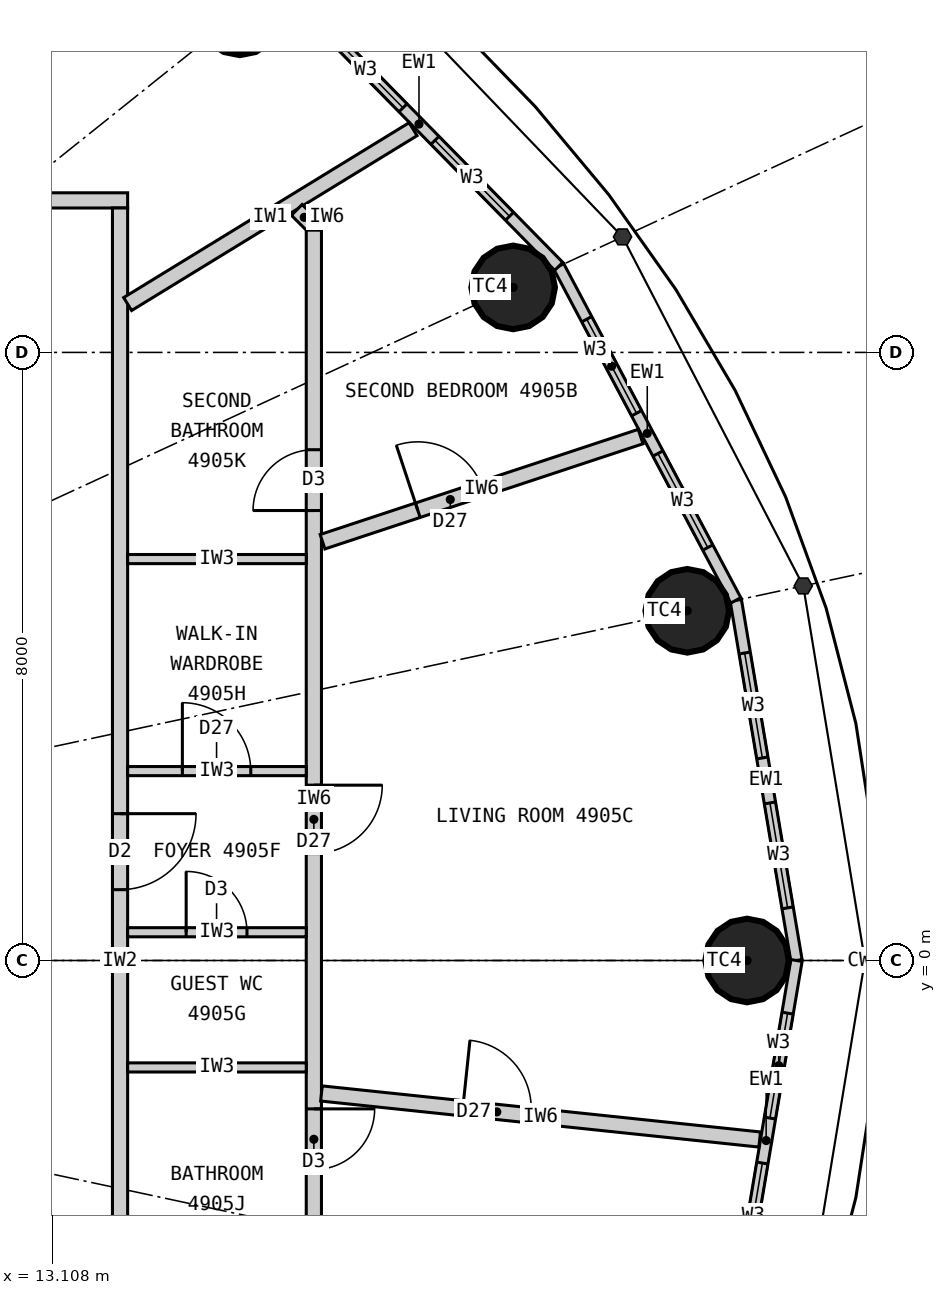
"""IFC4 building model, lengths in metres.
Left out: names, types, materials, properties, quantities, classifications, styles, units other than length and angle.
Written with IfcOpenShell. Run it as: python <this file> out.ifc"""

import sys

from ifc_helpers import new_model, si_unit, direction, frame, frame_2d, origin, origin_2d, place, context, subcontext, project, spatial, rectangle, circle, extrude, clip, halfspace, element, fill, save


model = new_model("IFC4")
c1 = context("Model", 3, precision=1e-05, world=origin(), true_north=direction((0.0, 1.0)))
c2 = subcontext(c1, "Body", "Model", "MODEL_VIEW")
j1 = project(units=[si_unit("LENGTHUNIT", "METRE"), si_unit("PLANEANGLEUNIT", "RADIAN")], contexts=[c1])
p1 = place(None, origin())
s1 = spatial("IfcSite", under=j1, at=p1, CompositionType="ELEMENT")
p2 = place(p1, origin())
s2 = spatial("IfcBuilding", under=s1, at=p2, CompositionType="ELEMENT")
p3 = place(p2, frame((0.0, 0.0, 183.0)))
s3 = spatial("IfcBuildingStorey", under=s2, at=p3, CompositionType="ELEMENT", Elevation=183.0)
for number, where, z_axis, x_axis in (
    (1, (22.25, 0.0, 0.0), (0.0, 0.0, 1.0), (1.0, 0.0, 0.0)),
    (2, (21.463, 4.601, 0.0), (0.0, 0.0, 1.0), (1.0, 0.0, 0.0)),
    (3, (19.172, 8.855, 0.0), (0.0, 0.0, 1.0), (1.0, 0.0, 0.0)),
    (4, (15.576, 12.461, 0.0), (0.0, 0.0, 1.0), (1.0, 0.0, 0.0)),
):
    element("IfcColumn", number, at=place(p3, frame(where, z_axis=z_axis, x_axis=x_axis)), inside=s3, PredefinedType="COLUMN", context=c2, shape_type="Clipping", body=[
        clip(extrude(circle(Radius=0.55, at=origin_2d()), origin(), (0.0, 0.0, 1.0), 3.3), halfspace(frame((0.0, 0.0, 2.25), z_axis=(0.0, 0.0, 1.0), x_axis=(1.0, 0.0, 0.0)), False)),
    ])
p4 = place(p3, frame((22.9, 0.0, 0.0), z_axis=(0.0, 0.0, 1.0), x_axis=(-0.166162111254, 0.986098449843, 0.0)))
e5 = element("IfcWall", 5, at=p4, inside=s3, PredefinedType="ELEMENTEDWALL", context=c2, shape_type="SweptSolid", body=[
    extrude(rectangle(XDim=4.805, YDim=0.15, at=frame_2d((2.402, 0.0))), origin(), (0.0, 0.0, 1.0), 3.05),
])
p5 = place(p4, frame((0.702, 0.0, 0.9)))
e6 = element("IfcOpeningElement", 6, at=p5, cuts=e5, PredefinedType="OPENING", context=c2, shape_type="SweptSolid", body=[
    extrude(rectangle(XDim=1.4, YDim=1.9, at=frame_2d((0.7, 0.95))), frame((0.0, 0.085, 0.0), z_axis=(0.0, -1.0, 0.0), x_axis=(1.0, 0.0, 0.0)), (0.0, 0.0, 1.0), 0.17),
])
p6 = place(p4, frame((2.702, 0.0, 0.9)))
e7 = element("IfcOpeningElement", 7, at=p6, cuts=e5, PredefinedType="OPENING", context=c2, shape_type="SweptSolid", body=[
    extrude(rectangle(XDim=1.4, YDim=1.9, at=frame_2d((0.7, 0.95))), frame((0.0, 0.085, 0.0), z_axis=(0.0, -1.0, 0.0), x_axis=(1.0, 0.0, 0.0)), (0.0, 0.0, 1.0), 0.17),
])
p7 = place(p3, frame((22.102, 4.738, 0.0), z_axis=(0.0, 0.0, 1.0), x_axis=(-0.468428906714, 0.883501193748, 0.0)))
e8 = element("IfcWall", 8, at=p7, inside=s3, PredefinedType="ELEMENTEDWALL", context=c2, shape_type="SweptSolid", body=[
    extrude(rectangle(XDim=4.974, YDim=0.15, at=frame_2d((2.487, 0.0))), origin(), (0.0, 0.0, 1.0), 3.05),
])
p8 = place(p7, frame((0.787, 0.0, 0.9)))
e9 = element("IfcOpeningElement", 9, at=p8, cuts=e8, PredefinedType="OPENING", context=c2, shape_type="SweptSolid", body=[
    extrude(rectangle(XDim=1.4, YDim=1.9, at=frame_2d((0.7, 0.95))), frame((0.0, 0.085, 0.0), z_axis=(0.0, -1.0, 0.0), x_axis=(1.0, 0.0, 0.0)), (0.0, 0.0, 1.0), 0.17),
])
p9 = place(p7, frame((2.787, 0.0, 0.9)))
e10 = element("IfcOpeningElement", 10, at=p9, cuts=e8, PredefinedType="OPENING", context=c2, shape_type="SweptSolid", body=[
    extrude(rectangle(XDim=1.4, YDim=1.9, at=frame_2d((0.7, 0.95))), frame((0.0, 0.085, 0.0), z_axis=(0.0, -1.0, 0.0), x_axis=(1.0, 0.0, 0.0)), (0.0, 0.0, 1.0), 0.17),
])
p10 = place(p3, frame((19.772, 9.132, 0.0), z_axis=(0.0, 0.0, 1.0), x_axis=(-0.700727467776, 0.71342905457, 0.0)))
e11 = element("IfcWall", 11, at=p10, inside=s3, PredefinedType="ELEMENTEDWALL", context=c2, shape_type="SweptSolid", body=[
    extrude(rectangle(XDim=5.247, YDim=0.15, at=frame_2d((2.624, 0.0))), origin(), (0.0, 0.0, 1.0), 3.05),
])
p11 = place(p10, frame((0.924, 0.0, 0.9)))
e12 = element("IfcOpeningElement", 12, at=p11, cuts=e11, PredefinedType="OPENING", context=c2, shape_type="SweptSolid", body=[
    extrude(rectangle(XDim=1.4, YDim=1.9, at=frame_2d((0.7, 0.95))), frame((0.0, 0.085, 0.0), z_axis=(0.0, -1.0, 0.0), x_axis=(1.0, 0.0, 0.0)), (0.0, 0.0, 1.0), 0.17),
])
p12 = place(p10, frame((2.924, 0.0, 0.9)))
e13 = element("IfcOpeningElement", 13, at=p12, cuts=e11, PredefinedType="OPENING", context=c2, shape_type="SweptSolid", body=[
    extrude(rectangle(XDim=1.4, YDim=1.9, at=frame_2d((0.7, 0.95))), frame((0.0, 0.085, 0.0), z_axis=(0.0, -1.0, 0.0), x_axis=(1.0, 0.0, 0.0)), (0.0, 0.0, 1.0), 0.17),
])
p13 = place(p3, frame((22.102, -4.738, 0.0), z_axis=(0.0, 0.0, 1.0), x_axis=(0.166162111254, 0.986098449843, 0.0)))
e14 = element("IfcWall", 14, at=p13, inside=s3, PredefinedType="ELEMENTEDWALL", context=c2, shape_type="SweptSolid", body=[
    extrude(rectangle(XDim=4.805, YDim=0.15, at=frame_2d((2.402, 0.0))), origin(), (0.0, 0.0, 1.0), 3.05),
])
p14 = place(p13, frame((0.702, 0.0, 0.9)))
e15 = element("IfcOpeningElement", 15, at=p14, cuts=e14, PredefinedType="OPENING", context=c2, shape_type="SweptSolid", body=[
    extrude(rectangle(XDim=1.4, YDim=1.9, at=frame_2d((0.7, 0.95))), frame((0.0, 0.085, 0.0), z_axis=(0.0, -1.0, 0.0), x_axis=(1.0, 0.0, 0.0)), (0.0, 0.0, 1.0), 0.17),
])
p15 = place(p13, frame((2.702, 0.0, 0.9)))
e16 = element("IfcOpeningElement", 16, at=p15, cuts=e14, PredefinedType="OPENING", context=c2, shape_type="SweptSolid", body=[
    extrude(rectangle(XDim=1.4, YDim=1.9, at=frame_2d((0.7, 0.95))), frame((0.0, 0.085, 0.0), z_axis=(0.0, -1.0, 0.0), x_axis=(1.0, 0.0, 0.0)), (0.0, 0.0, 1.0), 0.17),
])
p16 = place(p3, frame((-14.1, 10.0, 0.0), z_axis=(0.0, 0.0, 1.0), x_axis=(1.0, 0.0, 0.0)))
e17 = element("IfcWall", 17, at=p16, inside=s3, PredefinedType="PARTITIONING", context=c2, shape_type="SweptSolid", body=[
    extrude(rectangle(XDim=28.2, YDim=0.2, at=frame_2d((14.1, 0.0))), origin(), (0.0, 0.0, 1.0), 3.05),
])
p17 = place(p16, frame((24.549, 0.0, 0.0)))
e18 = element("IfcOpeningElement", 18, at=p17, cuts=e17, PredefinedType="OPENING", context=c2, shape_type="SweptSolid", body=[
    extrude(rectangle(XDim=1.0, YDim=2.2, at=frame_2d((0.5, 1.1))), frame((0.0, 0.11, 0.0), z_axis=(0.0, -1.0, 0.0), x_axis=(1.0, 0.0, 0.0)), (0.0, 0.0, 1.0), 0.22),
])
p18 = place(p16, frame((18.829, 0.0, 0.0)))
e19 = element("IfcOpeningElement", 19, at=p18, cuts=e17, PredefinedType="OPENING", context=c2, shape_type="SweptSolid", body=[
    extrude(rectangle(XDim=1.0, YDim=2.2, at=frame_2d((0.5, 1.1))), frame((0.0, 0.11, 0.0), z_axis=(0.0, -1.0, 0.0), x_axis=(1.0, 0.0, 0.0)), (0.0, 0.0, 1.0), 0.22),
])
p19 = place(p16, frame((12.8, 0.0, 0.0)))
e20 = element("IfcOpeningElement", 20, at=p19, cuts=e17, PredefinedType="OPENING", context=c2, shape_type="SweptSolid", body=[
    extrude(rectangle(XDim=1.0, YDim=2.2, at=frame_2d((0.5, 1.1))), frame((0.0, 0.11, 0.0), z_axis=(0.0, -1.0, 0.0), x_axis=(1.0, 0.0, 0.0)), (0.0, 0.0, 1.0), 0.22),
])
p20 = place(p16, frame((5.25, 0.0, 0.0)))
e21 = element("IfcOpeningElement", 21, at=p20, cuts=e17, PredefinedType="OPENING", context=c2, shape_type="SweptSolid", body=[
    extrude(rectangle(XDim=1.0, YDim=2.2, at=frame_2d((0.5, 1.1))), frame((0.0, 0.11, 0.0), z_axis=(0.0, -1.0, 0.0), x_axis=(1.0, 0.0, 0.0)), (0.0, 0.0, 1.0), 0.22),
])
p21 = place(p3, frame((14.0, -9.9, 0.0), z_axis=(0.0, 0.0, 1.0), x_axis=(0.0, 1.0, 0.0)))
e22 = element("IfcWall", 22, at=p21, inside=s3, PredefinedType="PARTITIONING", context=c2, shape_type="SweptSolid", body=[
    extrude(rectangle(XDim=19.8, YDim=0.2, at=frame_2d((9.9, 0.0))), origin(), (0.0, 0.0, 1.0), 3.05),
])
p22 = place(p21, frame((1.1, 0.0, 0.0)))
e23 = element("IfcOpeningElement", 23, at=p22, cuts=e22, PredefinedType="OPENING", context=c2, shape_type="SweptSolid", body=[
    extrude(rectangle(XDim=1.0, YDim=2.2, at=frame_2d((0.5, 1.1))), frame((0.0, 0.11, 0.0), z_axis=(0.0, -1.0, 0.0), x_axis=(1.0, 0.0, 0.0)), (0.0, 0.0, 1.0), 0.22),
])
p23 = place(p21, frame((10.832, 0.0, 0.0)))
e24 = element("IfcOpeningElement", 24, at=p23, cuts=e22, PredefinedType="OPENING", context=c2, shape_type="SweptSolid", body=[
    extrude(rectangle(XDim=1.0, YDim=2.2, at=frame_2d((0.5, 1.1))), frame((0.0, 0.11, 0.0), z_axis=(0.0, -1.0, 0.0), x_axis=(1.0, 0.0, 0.0)), (0.0, 0.0, 1.0), 0.22),
])
p24 = place(p3, frame((14.1, 8.636, 0.0), z_axis=(0.0, 0.0, 1.0), x_axis=(0.852731884196, 0.522348862041, 0.0)))
e25 = element("IfcWall", 25, at=p24, inside=s3, PredefinedType="PARTITIONING", context=c2, shape_type="SweptSolid", body=[
    extrude(rectangle(XDim=4.404, YDim=0.2, at=frame_2d((2.202, 0.0))), origin(), (0.0, 0.0, 1.0), 3.05),
])
p25 = place(p3, frame((16.55, -5.35, 0.0), z_axis=(0.0, 0.0, 1.0), x_axis=(0.0, 1.0, 0.0)))
e26 = element("IfcWall", 26, at=p25, inside=s3, PredefinedType="PARTITIONING", context=c2, shape_type="SweptSolid", body=[
    extrude(rectangle(XDim=14.959, YDim=0.2, at=frame_2d((7.479, 0.0))), origin(), (0.0, 0.0, 1.0), 3.05),
])
p26 = place(p25, frame((2.598, 0.0, 0.0)))
e27 = element("IfcOpeningElement", 27, at=p26, cuts=e26, PredefinedType="OPENING", context=c2, shape_type="SweptSolid", body=[
    extrude(rectangle(XDim=0.8, YDim=2.1, at=frame_2d((0.4, 1.05))), frame((0.0, 0.11, 0.0), z_axis=(0.0, -1.0, 0.0), x_axis=(1.0, 0.0, 0.0)), (0.0, 0.0, 1.0), 0.22),
])
p27 = place(p25, frame((11.27, 0.0, 0.0)))
e28 = element("IfcOpeningElement", 28, at=p27, cuts=e26, PredefinedType="OPENING", context=c2, shape_type="SweptSolid", body=[
    extrude(rectangle(XDim=0.8, YDim=2.1, at=frame_2d((0.4, 1.05))), frame((0.0, 0.11, 0.0), z_axis=(0.0, -1.0, 0.0), x_axis=(1.0, 0.0, 0.0)), (0.0, 0.0, 1.0), 0.22),
])
p28 = place(p25, frame((6.757, 0.0, 0.0)))
e29 = element("IfcOpeningElement", 29, at=p28, cuts=e26, PredefinedType="OPENING", context=c2, shape_type="SweptSolid", body=[
    extrude(rectangle(XDim=0.9, YDim=2.1, at=frame_2d((0.45, 1.05))), frame((0.0, 0.11, 0.0), z_axis=(0.0, -1.0, 0.0), x_axis=(1.0, 0.0, 0.0)), (0.0, 0.0, 1.0), 0.22),
])
p29 = place(p3, frame((16.521, 9.679, 0.0), z_axis=(0.0, 0.0, 1.0), x_axis=(-0.707106781187, 0.707106781187, 0.0)))
e30 = element("IfcWall", 30, at=p29, inside=s3, PredefinedType="PARTITIONING", context=c2, shape_type="SweptSolid", body=[
    extrude(rectangle(XDim=0.277, YDim=0.2, at=frame_2d((0.138, 0.0))), origin(), (0.0, 0.0, 1.0), 3.05),
])
p30 = place(p3, frame((16.65, -1.75, 0.0), z_axis=(0.0, 0.0, 1.0), x_axis=(0.994527351734, -0.104476536379, 0.0)))
e31 = element("IfcWall", 31, at=p30, inside=s3, PredefinedType="PARTITIONING", context=c2, shape_type="SweptSolid", body=[
    extrude(rectangle(XDim=5.798, YDim=0.2, at=frame_2d((2.899, 0.0))), origin(), (0.0, 0.0, 1.0), 3.05),
])
p31 = place(p30, frame((1.87, 0.0, 0.0)))
e32 = element("IfcOpeningElement", 32, at=p31, cuts=e31, PredefinedType="OPENING", context=c2, shape_type="SweptSolid", body=[
    extrude(rectangle(XDim=0.9, YDim=2.1, at=frame_2d((0.45, 1.05))), frame((0.0, 0.11, 0.0), z_axis=(0.0, -1.0, 0.0), x_axis=(1.0, 0.0, 0.0)), (0.0, 0.0, 1.0), 0.22),
])
p32 = place(p3, frame((16.664, 5.509, 0.0), z_axis=(0.0, 0.0, 1.0), x_axis=(0.949461375992, 0.313883888563, 0.0)))
e33 = element("IfcWall", 33, at=p32, inside=s3, PredefinedType="PARTITIONING", context=c2, shape_type="SweptSolid", body=[
    extrude(rectangle(XDim=4.408, YDim=0.2, at=frame_2d((2.204, 0.0))), origin(), (0.0, 0.0, 1.0), 3.05),
])
p33 = place(p32, frame((1.32, 0.0, 0.0)))
e34 = element("IfcOpeningElement", 34, at=p33, cuts=e33, PredefinedType="OPENING", context=c2, shape_type="SweptSolid", body=[
    extrude(rectangle(XDim=0.9, YDim=2.1, at=frame_2d((0.45, 1.05))), frame((0.0, 0.11, 0.0), z_axis=(0.0, -1.0, 0.0), x_axis=(1.0, 0.0, 0.0)), (0.0, 0.0, 1.0), 0.22),
])
p34 = place(p3, frame((14.1, -1.407, 0.0), z_axis=(0.0, 0.0, 1.0), x_axis=(1.0, 0.0, 0.0)))
e35 = element("IfcWall", 35, at=p34, inside=s3, PredefinedType="PARTITIONING", context=c2, shape_type="SweptSolid", body=[
    extrude(rectangle(XDim=2.35, YDim=0.12, at=frame_2d((1.175, 0.0))), origin(), (0.0, 0.0, 1.0), 2.3),
])
p35 = place(p3, frame((14.1, 0.372, 0.0), z_axis=(0.0, 0.0, 1.0), x_axis=(1.0, 0.0, 0.0)))
e36 = element("IfcWall", 36, at=p35, inside=s3, PredefinedType="PARTITIONING", context=c2, shape_type="SweptSolid", body=[
    extrude(rectangle(XDim=2.35, YDim=0.12, at=frame_2d((1.175, 0.0))), origin(), (0.0, 0.0, 1.0), 3.05),
])
p36 = place(p35, frame((0.77, 0.0, 0.0)))
e37 = element("IfcOpeningElement", 37, at=p36, cuts=e36, PredefinedType="OPENING", context=c2, shape_type="SweptSolid", body=[
    extrude(rectangle(XDim=0.8, YDim=2.1, at=frame_2d((0.4, 1.05))), frame((0.0, 0.07, 0.0), z_axis=(0.0, -1.0, 0.0), x_axis=(1.0, 0.0, 0.0)), (0.0, 0.0, 1.0), 0.14),
])
p37 = place(p3, frame((14.1, 2.492, 0.0), z_axis=(0.0, 0.0, 1.0), x_axis=(1.0, 0.0, 0.0)))
e38 = element("IfcWall", 38, at=p37, inside=s3, PredefinedType="PARTITIONING", context=c2, shape_type="SweptSolid", body=[
    extrude(rectangle(XDim=2.35, YDim=0.12, at=frame_2d((1.175, 0.0))), origin(), (0.0, 0.0, 1.0), 3.05),
])
p38 = place(p37, frame((0.72, 0.0, 0.0)))
e39 = element("IfcOpeningElement", 39, at=p38, cuts=e38, PredefinedType="OPENING", context=c2, shape_type="SweptSolid", body=[
    extrude(rectangle(XDim=0.9, YDim=2.1, at=frame_2d((0.45, 1.05))), frame((0.0, 0.07, 0.0), z_axis=(0.0, -1.0, 0.0), x_axis=(1.0, 0.0, 0.0)), (0.0, 0.0, 1.0), 0.14),
])
p39 = place(p3, frame((14.1, 5.281, 0.0), z_axis=(0.0, 0.0, 1.0), x_axis=(1.0, 0.0, 0.0)))
e40 = element("IfcWall", 40, at=p39, inside=s3, PredefinedType="PARTITIONING", context=c2, shape_type="SweptSolid", body=[
    extrude(rectangle(XDim=2.35, YDim=0.12, at=frame_2d((1.175, 0.0))), origin(), (0.0, 0.0, 1.0), 3.05),
])
p40 = place(p5, origin())
e41 = element("IfcWindow", 41, at=p40, inside=s3, PartitioningType="SINGLE_PANEL", PredefinedType="WINDOW", context=c2, shape_type="SweptSolid", body=[
    extrude(rectangle(XDim=1.4, YDim=1.9, at=frame_2d((0.7, 0.95))), frame((0.0, 0.03, 0.0), z_axis=(0.0, -1.0, 0.0), x_axis=(1.0, 0.0, 0.0)), (0.0, 0.0, 1.0), 0.06),
])
fill(e6, e41)
p41 = place(p6, origin())
e42 = element("IfcWindow", 42, at=p41, inside=s3, PartitioningType="SINGLE_PANEL", PredefinedType="WINDOW", context=c2, shape_type="SweptSolid", body=[
    extrude(rectangle(XDim=1.4, YDim=1.9, at=frame_2d((0.7, 0.95))), frame((0.0, 0.03, 0.0), z_axis=(0.0, -1.0, 0.0), x_axis=(1.0, 0.0, 0.0)), (0.0, 0.0, 1.0), 0.06),
])
fill(e7, e42)
p42 = place(p8, origin())
e43 = element("IfcWindow", 43, at=p42, inside=s3, PartitioningType="SINGLE_PANEL", PredefinedType="WINDOW", context=c2, shape_type="SweptSolid", body=[
    extrude(rectangle(XDim=1.4, YDim=1.9, at=frame_2d((0.7, 0.95))), frame((0.0, 0.03, 0.0), z_axis=(0.0, -1.0, 0.0), x_axis=(1.0, 0.0, 0.0)), (0.0, 0.0, 1.0), 0.06),
])
fill(e9, e43)
p43 = place(p9, origin())
e44 = element("IfcWindow", 44, at=p43, inside=s3, PartitioningType="SINGLE_PANEL", PredefinedType="WINDOW", context=c2, shape_type="SweptSolid", body=[
    extrude(rectangle(XDim=1.4, YDim=1.9, at=frame_2d((0.7, 0.95))), frame((0.0, 0.03, 0.0), z_axis=(0.0, -1.0, 0.0), x_axis=(1.0, 0.0, 0.0)), (0.0, 0.0, 1.0), 0.06),
])
fill(e10, e44)
p44 = place(p11, origin())
e45 = element("IfcWindow", 45, at=p44, inside=s3, PartitioningType="SINGLE_PANEL", PredefinedType="WINDOW", context=c2, shape_type="SweptSolid", body=[
    extrude(rectangle(XDim=1.4, YDim=1.9, at=frame_2d((0.7, 0.95))), frame((0.0, 0.03, 0.0), z_axis=(0.0, -1.0, 0.0), x_axis=(1.0, 0.0, 0.0)), (0.0, 0.0, 1.0), 0.06),
])
fill(e12, e45)
p45 = place(p12, origin())
e46 = element("IfcWindow", 46, at=p45, inside=s3, PartitioningType="SINGLE_PANEL", PredefinedType="WINDOW", context=c2, shape_type="SweptSolid", body=[
    extrude(rectangle(XDim=1.4, YDim=1.9, at=frame_2d((0.7, 0.95))), frame((0.0, 0.03, 0.0), z_axis=(0.0, -1.0, 0.0), x_axis=(1.0, 0.0, 0.0)), (0.0, 0.0, 1.0), 0.06),
])
fill(e13, e46)
p46 = place(p14, origin())
e47 = element("IfcWindow", 47, at=p46, inside=s3, PartitioningType="SINGLE_PANEL", PredefinedType="WINDOW", context=c2, shape_type="SweptSolid", body=[
    extrude(rectangle(XDim=1.4, YDim=1.9, at=frame_2d((0.7, 0.95))), frame((0.0, 0.03, 0.0), z_axis=(0.0, -1.0, 0.0), x_axis=(1.0, 0.0, 0.0)), (0.0, 0.0, 1.0), 0.06),
])
fill(e15, e47)
p47 = place(p15, origin())
e48 = element("IfcWindow", 48, at=p47, inside=s3, PartitioningType="SINGLE_PANEL", PredefinedType="WINDOW", context=c2, shape_type="SweptSolid", body=[
    extrude(rectangle(XDim=1.4, YDim=1.9, at=frame_2d((0.7, 0.95))), frame((0.0, 0.03, 0.0), z_axis=(0.0, -1.0, 0.0), x_axis=(1.0, 0.0, 0.0)), (0.0, 0.0, 1.0), 0.06),
])
fill(e16, e48)
p48 = place(p23, origin())
e49 = element("IfcDoor", 49, at=p48, inside=s3, OperationType="SINGLE_SWING_RIGHT", PredefinedType="DOOR", context=c2, shape_type="SweptSolid", body=[
    extrude(rectangle(XDim=1.0, YDim=2.2, at=frame_2d((0.5, 1.1))), frame((0.0, 0.025, 0.0), z_axis=(0.0, -1.0, 0.0), x_axis=(1.0, 0.0, 0.0)), (0.0, 0.0, 1.0), 0.05),
])
fill(e24, e49)
p49 = place(p26, origin())
e50 = element("IfcDoor", 50, at=p49, inside=s3, OperationType="SINGLE_SWING_RIGHT", PredefinedType="DOOR", context=c2, shape_type="SweptSolid", body=[
    extrude(rectangle(XDim=0.8, YDim=2.1, at=frame_2d((0.4, 1.05))), frame((0.0, 0.025, 0.0), z_axis=(0.0, -1.0, 0.0), x_axis=(1.0, 0.0, 0.0)), (0.0, 0.0, 1.0), 0.05),
])
fill(e27, e50)
p50 = place(p36, origin())
e51 = element("IfcDoor", 51, at=p50, inside=s3, OperationType="SINGLE_SWING_LEFT", PredefinedType="DOOR", context=c2, shape_type="SweptSolid", body=[
    extrude(rectangle(XDim=0.8, YDim=2.1, at=frame_2d((0.4, 1.05))), frame((0.0, 0.025, 0.0), z_axis=(0.0, -1.0, 0.0), x_axis=(1.0, 0.0, 0.0)), (0.0, 0.0, 1.0), 0.05),
])
fill(e37, e51)
p51 = place(p38, origin())
e52 = element("IfcDoor", 52, at=p51, inside=s3, OperationType="SINGLE_SWING_LEFT", PredefinedType="DOOR", context=c2, shape_type="SweptSolid", body=[
    extrude(rectangle(XDim=0.9, YDim=2.1, at=frame_2d((0.45, 1.05))), frame((0.0, 0.025, 0.0), z_axis=(0.0, -1.0, 0.0), x_axis=(1.0, 0.0, 0.0)), (0.0, 0.0, 1.0), 0.05),
])
fill(e39, e52)
p52 = place(p27, origin())
e53 = element("IfcDoor", 53, at=p52, inside=s3, OperationType="SINGLE_SWING_LEFT", PredefinedType="DOOR", context=c2, shape_type="SweptSolid", body=[
    extrude(rectangle(XDim=0.8, YDim=2.1, at=frame_2d((0.4, 1.05))), frame((0.0, 0.025, 0.0), z_axis=(0.0, -1.0, 0.0), x_axis=(1.0, 0.0, 0.0)), (0.0, 0.0, 1.0), 0.05),
])
fill(e28, e53)
p53 = place(p28, origin())
e54 = element("IfcDoor", 54, at=p53, inside=s3, OperationType="SINGLE_SWING_RIGHT", PredefinedType="DOOR", context=c2, shape_type="SweptSolid", body=[
    extrude(rectangle(XDim=0.9, YDim=2.1, at=frame_2d((0.45, 1.05))), frame((0.0, 0.025, 0.0), z_axis=(0.0, -1.0, 0.0), x_axis=(1.0, 0.0, 0.0)), (0.0, 0.0, 1.0), 0.05),
])
fill(e29, e54)
p54 = place(p31, origin())
e55 = element("IfcDoor", 55, at=p54, inside=s3, OperationType="SINGLE_SWING_LEFT", PredefinedType="DOOR", context=c2, shape_type="SweptSolid", body=[
    extrude(rectangle(XDim=0.9, YDim=2.1, at=frame_2d((0.45, 1.05))), frame((0.0, 0.025, 0.0), z_axis=(0.0, -1.0, 0.0), x_axis=(1.0, 0.0, 0.0)), (0.0, 0.0, 1.0), 0.05),
])
fill(e32, e55)
p55 = place(p33, origin())
e56 = element("IfcDoor", 56, at=p55, inside=s3, OperationType="SINGLE_SWING_LEFT", PredefinedType="DOOR", context=c2, shape_type="SweptSolid", body=[
    extrude(rectangle(XDim=0.9, YDim=2.1, at=frame_2d((0.45, 1.05))), frame((0.0, 0.025, 0.0), z_axis=(0.0, -1.0, 0.0), x_axis=(1.0, 0.0, 0.0)), (0.0, 0.0, 1.0), 0.05),
])
fill(e34, e56)
save(model, sys.argv[1])
